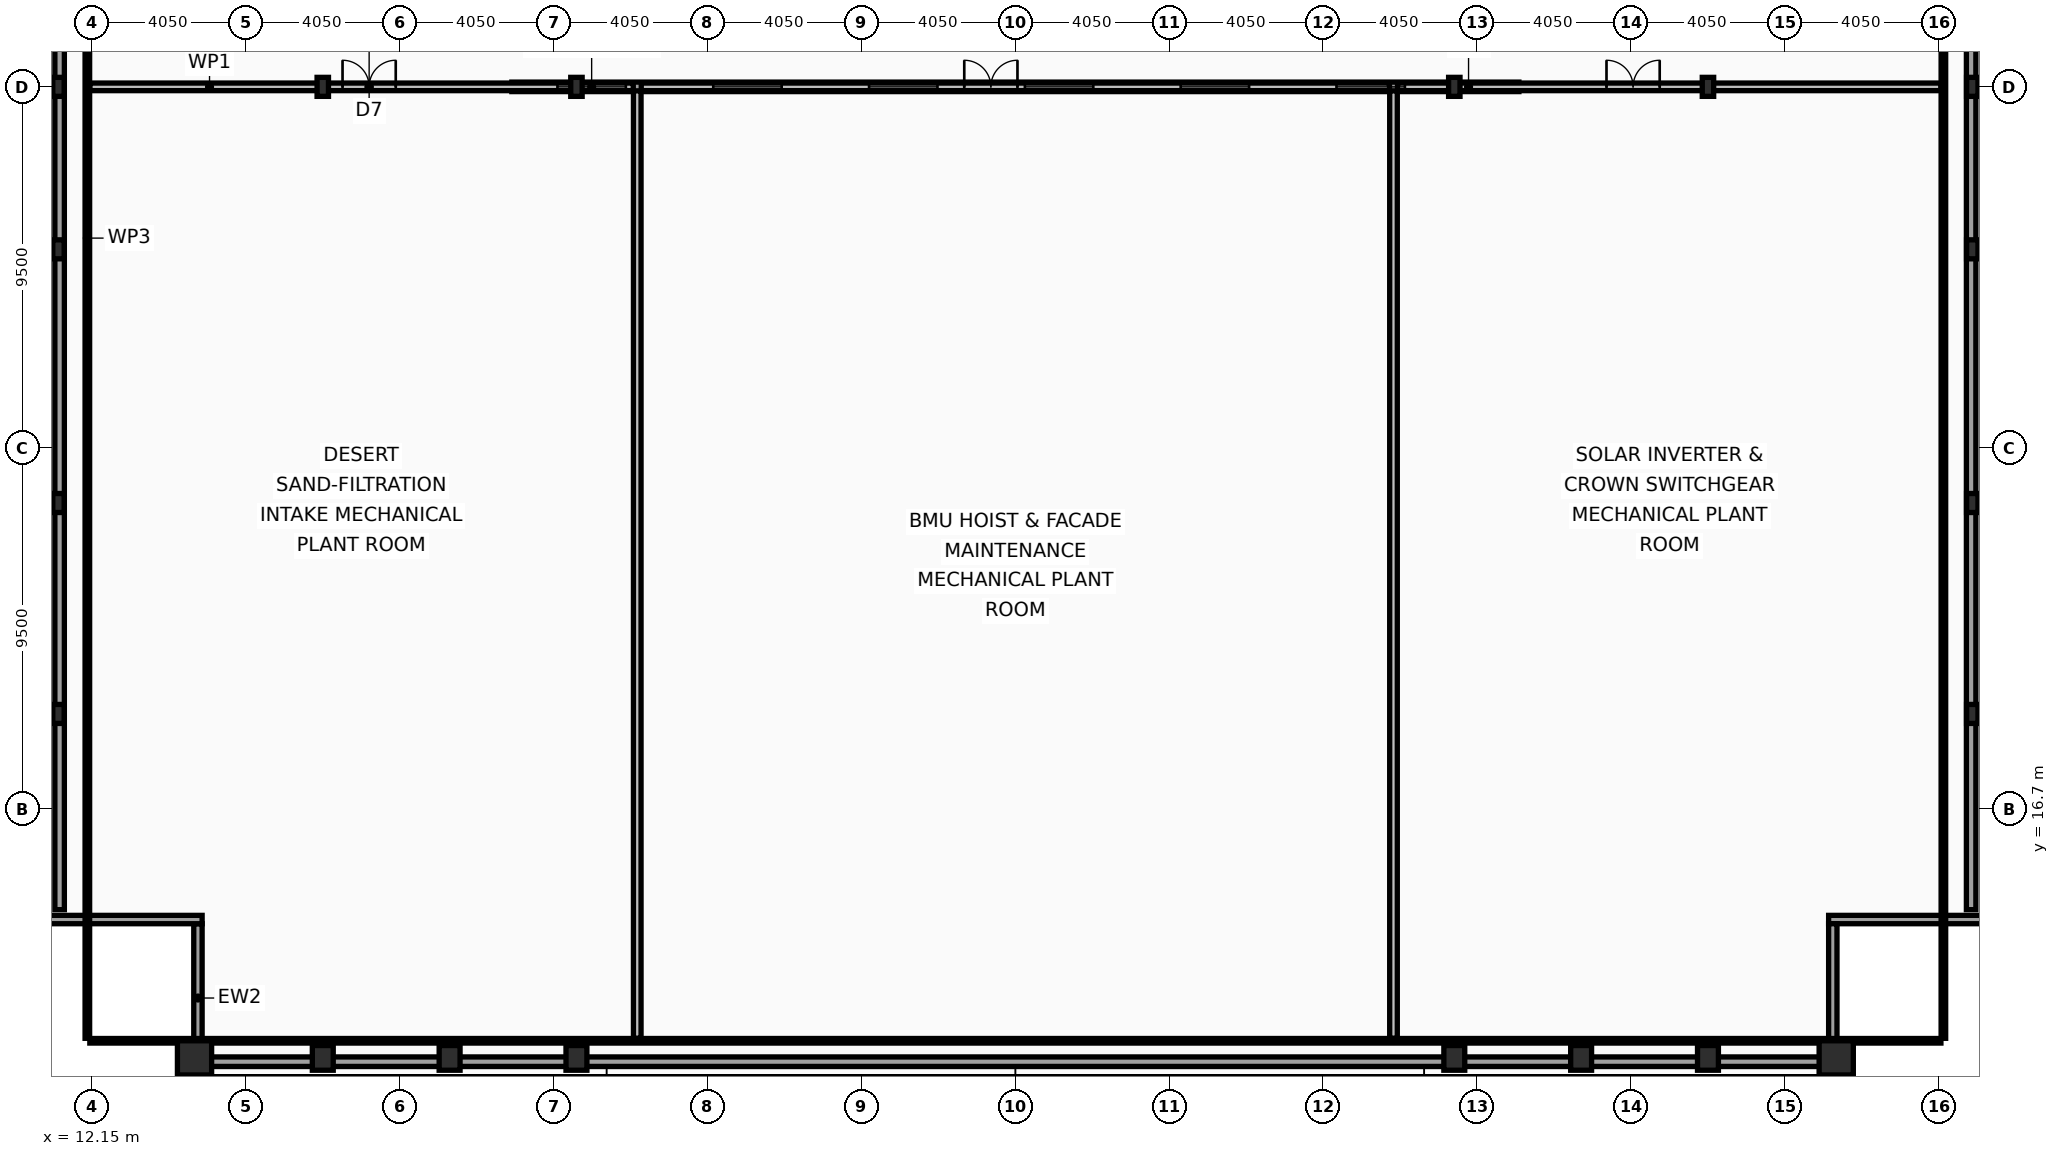
"""IFC4 building model, lengths in metres.
Left out: names, types, materials, properties, quantities, classifications, styles, units other than length and angle.
Written with IfcOpenShell. Run it as: python <this file> out.ifc"""

import sys

from ifc_helpers import new_model, si_unit, direction, frame, frame_2d, origin, origin_2d, place, context, subcontext, project, spatial, rectangle, hollow_rectangle, i_section, extrude, element, fill, save


model = new_model("IFC4")
c1 = context("Model", 3, precision=1e-05, world=origin(), true_north=direction((0.0, 1.0)))
c2 = subcontext(c1, "Body", "Model", "MODEL_VIEW")
j1 = project(units=[si_unit("LENGTHUNIT", "METRE"), si_unit("PLANEANGLEUNIT", "RADIAN")], contexts=[c1])
p1 = place(None, origin())
s1 = spatial("IfcSite", under=j1, at=p1, CompositionType="ELEMENT")
p2 = place(p1, origin())
s2 = spatial("IfcBuilding", under=s1, at=p2, CompositionType="ELEMENT")
p3 = place(p2, frame((0.0, 0.0, 378.6)))
s3 = spatial("IfcBuildingStorey", under=s2, at=p3, CompositionType="ELEMENT", Elevation=378.6)
for number, where, z_axis, x_axis in (
    (1, (14.85, 10.15, 0.0), (0.0, 0.0, 1.0), (1.0, 0.0, 0.0)),
    (2, (58.05, 10.15, 0.0), (0.0, 0.0, 1.0), (1.0, 0.0, 0.0)),
):
    element("IfcColumn", number, at=place(p3, frame(where, z_axis=z_axis, x_axis=x_axis)), inside=s3, PredefinedType="COLUMN", context=c2, shape_type="SweptSolid", body=[
        extrude(hollow_rectangle(XDim=0.9, YDim=0.9, WallThickness=0.05, at=origin_2d()), origin(), (0.0, 0.0, 1.0), 5.36),
    ])
for number, where, z_axis, x_axis in (
    (3, (18.225, 10.15, 0.0), (0.0, 0.0, 1.0), (1.0, 0.0, 0.0)),
    (4, (21.562, 10.15, 0.0), (0.0, 0.0, 1.0), (1.0, 0.0, 0.0)),
    (5, (24.9, 10.15, 0.0), (0.0, 0.0, 1.0), (1.0, 0.0, 0.0)),
    (6, (48.0, 10.15, 0.0), (0.0, 0.0, 1.0), (1.0, 0.0, 0.0)),
    (7, (51.337, 10.15, 0.0), (0.0, 0.0, 1.0), (1.0, 0.0, 0.0)),
    (8, (54.675, 10.15, 0.0), (0.0, 0.0, 1.0), (1.0, 0.0, 0.0)),
):
    element("IfcColumn", number, at=place(p3, frame(where, z_axis=z_axis, x_axis=x_axis)), inside=s3, PredefinedType="COLUMN", context=c2, shape_type="SweptSolid", body=[
        extrude(hollow_rectangle(XDim=0.55, YDim=0.65, WallThickness=0.04, at=origin_2d()), origin(), (0.0, 0.0, 1.0), 5.36),
    ])
for number, where, z_axis, x_axis in (
    (9, (11.27, 19.2, 0.0), (0.0, 0.0, 1.0), (1.0, 0.0, 0.0)),
    (10, (11.27, 24.75, 0.0), (0.0, 0.0, 1.0), (1.0, 0.0, 0.0)),
    (11, (11.27, 31.425, 0.0), (0.0, 0.0, 1.0), (1.0, 0.0, 0.0)),
    (12, (11.27, 35.7, 0.0), (0.0, 0.0, 1.0), (1.0, 0.0, 0.0)),
    (13, (61.63, 19.2, 0.0), (0.0, 0.0, 1.0), (1.0, 0.0, 0.0)),
    (14, (61.63, 24.75, 0.0), (0.0, 0.0, 1.0), (1.0, 0.0, 0.0)),
    (15, (61.63, 31.425, 0.0), (0.0, 0.0, 1.0), (1.0, 0.0, 0.0)),
    (16, (61.63, 35.7, 0.0), (0.0, 0.0, 1.0), (1.0, 0.0, 0.0)),
):
    element("IfcColumn", number, at=place(p3, frame(where, z_axis=z_axis, x_axis=x_axis)), inside=s3, PredefinedType="COLUMN", context=c2, shape_type="SweptSolid", body=[
        extrude(i_section(OverallWidth=0.3, OverallDepth=0.5, WebThickness=0.014, FlangeThickness=0.028, at=origin_2d()), origin(), (0.0, 0.0, 1.0), 5.36),
    ])
p4 = place(p3, frame((18.225, 35.7, 0.0), z_axis=(0.0, 0.0, 1.0), x_axis=(1.0, 0.0, 0.0)))
e17 = element("IfcColumn", 17, at=p4, inside=s3, PredefinedType="COLUMN", context=c2, shape_type="SweptSolid", body=[
    extrude(i_section(OverallWidth=0.3, OverallDepth=0.5, WebThickness=0.014, FlangeThickness=0.028, at=origin_2d()), origin(), (0.0, 0.0, 1.0), 5.28),
])
for number, where, z_axis, x_axis in (
    (18, (24.9, 35.7, 0.0), (0.0, 0.0, 1.0), (1.0, 0.0, 0.0)),
    (19, (48.0, 35.7, 0.0), (0.0, 0.0, 1.0), (1.0, 0.0, 0.0)),
):
    element("IfcColumn", number, at=place(p3, frame(where, z_axis=z_axis, x_axis=x_axis)), inside=s3, PredefinedType="COLUMN", context=c2, shape_type="SweptSolid", body=[
        extrude(i_section(OverallWidth=0.3, OverallDepth=0.5, WebThickness=0.014, FlangeThickness=0.028, at=origin_2d()), origin(), (0.0, 0.0, 1.0), 5.36),
    ])
p5 = place(p3, frame((54.675, 35.7, 0.0), z_axis=(0.0, 0.0, 1.0), x_axis=(1.0, 0.0, 0.0)))
e20 = element("IfcColumn", 20, at=p5, inside=s3, PredefinedType="COLUMN", context=c2, shape_type="SweptSolid", body=[
    extrude(i_section(OverallWidth=0.3, OverallDepth=0.5, WebThickness=0.014, FlangeThickness=0.028, at=origin_2d()), origin(), (0.0, 0.0, 1.0), 5.28),
])
p6 = place(p3, frame((14.94, 9.77, 0.0), z_axis=(0.0, 0.0, 1.0), x_axis=(0.0, 1.0, 0.0)))
e21 = element("IfcWall", 21, at=p6, inside=s3, PredefinedType="SOLIDWALL", context=c2, shape_type="SweptSolid", body=[
    extrude(rectangle(XDim=3.91, YDim=0.22, at=frame_2d((1.955, 0.0))), origin(), (0.0, 0.0, 1.0), 3.62),
])
p7 = place(p3, frame((15.05, 13.79, 0.0), z_axis=(0.0, 0.0, 1.0), x_axis=(-1.0, 0.0, 0.0)))
e22 = element("IfcWall", 22, at=p7, inside=s3, PredefinedType="SOLIDWALL", context=c2, shape_type="SweptSolid", body=[
    extrude(rectangle(XDim=4.13, YDim=0.22, at=frame_2d((2.065, 0.0))), origin(), (0.0, 0.0, 1.0), 3.62),
])
p8 = place(p3, frame((61.98, 13.79, 0.0), z_axis=(0.0, 0.0, 1.0), x_axis=(-1.0, 0.0, 0.0)))
e23 = element("IfcWall", 23, at=p8, inside=s3, PredefinedType="SOLIDWALL", context=c2, shape_type="SweptSolid", body=[
    extrude(rectangle(XDim=4.13, YDim=0.22, at=frame_2d((2.065, 0.0))), origin(), (0.0, 0.0, 1.0), 3.62),
])
p9 = place(p3, frame((57.96, 13.68, 0.0), z_axis=(0.0, 0.0, 1.0), x_axis=(0.0, -1.0, 0.0)))
e24 = element("IfcWall", 24, at=p9, inside=s3, PredefinedType="SOLIDWALL", context=c2, shape_type="SweptSolid", body=[
    extrude(rectangle(XDim=3.91, YDim=0.22, at=frame_2d((1.955, 0.0))), origin(), (0.0, 0.0, 1.0), 3.62),
])
p10 = place(p3, frame((23.2, 35.7, 5.6), z_axis=(0.0, 0.0, 1.0), x_axis=(1.0, 0.0, 0.0)))
e25 = element("IfcWall", 25, at=p10, inside=s3, PredefinedType="PARAPET", context=c2, shape_type="SweptSolid", body=[
    extrude(rectangle(XDim=26.5, YDim=0.25, at=frame_2d((13.25, 0.0))), origin(), (0.0, 0.0, 1.0), 0.93),
])
p11 = place(p10, frame((1.2, 0.0, 0.16)))
e26 = element("IfcOpeningElement", 26, at=p11, cuts=e25, PredefinedType="OPENING", context=c2, shape_type="SweptSolid", body=[
    extrude(rectangle(XDim=1.8, YDim=0.55, at=frame_2d((0.9, 0.275))), frame((0.0, 0.135, 0.0), z_axis=(0.0, -1.0, 0.0), x_axis=(1.0, 0.0, 0.0)), (0.0, 0.0, 1.0), 0.27),
])
p12 = place(p10, frame((5.3, 0.0, 0.16)))
e27 = element("IfcOpeningElement", 27, at=p12, cuts=e25, PredefinedType="OPENING", context=c2, shape_type="SweptSolid", body=[
    extrude(rectangle(XDim=1.8, YDim=0.55, at=frame_2d((0.9, 0.275))), frame((0.0, 0.135, 0.0), z_axis=(0.0, -1.0, 0.0), x_axis=(1.0, 0.0, 0.0)), (0.0, 0.0, 1.0), 0.27),
])
p13 = place(p10, frame((9.4, 0.0, 0.16)))
e28 = element("IfcOpeningElement", 28, at=p13, cuts=e25, PredefinedType="OPENING", context=c2, shape_type="SweptSolid", body=[
    extrude(rectangle(XDim=1.8, YDim=0.55, at=frame_2d((0.9, 0.275))), frame((0.0, 0.135, 0.0), z_axis=(0.0, -1.0, 0.0), x_axis=(1.0, 0.0, 0.0)), (0.0, 0.0, 1.0), 0.27),
])
p14 = place(p10, frame((13.5, 0.0, 0.16)))
e29 = element("IfcOpeningElement", 29, at=p14, cuts=e25, PredefinedType="OPENING", context=c2, shape_type="SweptSolid", body=[
    extrude(rectangle(XDim=1.8, YDim=0.55, at=frame_2d((0.9, 0.275))), frame((0.0, 0.135, 0.0), z_axis=(0.0, -1.0, 0.0), x_axis=(1.0, 0.0, 0.0)), (0.0, 0.0, 1.0), 0.27),
])
p15 = place(p10, frame((17.6, 0.0, 0.16)))
e30 = element("IfcOpeningElement", 30, at=p15, cuts=e25, PredefinedType="OPENING", context=c2, shape_type="SweptSolid", body=[
    extrude(rectangle(XDim=1.8, YDim=0.55, at=frame_2d((0.9, 0.275))), frame((0.0, 0.135, 0.0), z_axis=(0.0, -1.0, 0.0), x_axis=(1.0, 0.0, 0.0)), (0.0, 0.0, 1.0), 0.27),
])
p16 = place(p10, frame((21.7, 0.0, 0.16)))
e31 = element("IfcOpeningElement", 31, at=p16, cuts=e25, PredefinedType="OPENING", context=c2, shape_type="SweptSolid", body=[
    extrude(rectangle(XDim=1.8, YDim=0.55, at=frame_2d((0.9, 0.275))), frame((0.0, 0.135, 0.0), z_axis=(0.0, -1.0, 0.0), x_axis=(1.0, 0.0, 0.0)), (0.0, 0.0, 1.0), 0.27),
])
p17 = place(p3, frame((15.2, 10.05, 5.58), z_axis=(0.0, 0.0, 1.0), x_axis=(1.0, 0.0, 0.0)))
e32 = element("IfcWall", 32, at=p17, inside=s3, PredefinedType="PARAPET", context=c2, shape_type="SweptSolid", body=[
    extrude(rectangle(XDim=42.5, YDim=0.25, at=frame_2d((21.25, 0.0))), origin(), (0.0, 0.0, 1.0), 0.9),
])
for number, where, z_axis, x_axis in (
    (33, (11.3, 49.35, 5.58), (0.0, 0.0, 1.0), (0.0, -1.0, 0.0)),
    (34, (61.6, 14.05, 5.58), (0.0, 0.0, 1.0), (0.0, 1.0, 0.0)),
):
    element("IfcWall", number, at=place(p3, frame(where, z_axis=z_axis, x_axis=x_axis)), inside=s3, PredefinedType="PARAPET", context=c2, shape_type="SweptSolid", body=[
        extrude(rectangle(XDim=35.3, YDim=0.25, at=frame_2d((17.65, 0.0))), origin(), (0.0, 0.0, 1.0), 0.9),
    ])
p18 = place(p3, frame((12.095, 35.7, 0.0), z_axis=(0.0, 0.0, 1.0), x_axis=(1.0, 0.0, 0.0)))
e35 = element("IfcWall", 35, at=p18, inside=s3, PredefinedType="PARTITIONING", context=c2, shape_type="SweptSolid", body=[
    extrude(rectangle(XDim=14.3, YDim=0.2, at=frame_2d((7.15, 0.0))), origin(), (0.0, 0.0, 1.0), 4.18),
])
p19 = place(p18, frame((6.65, 0.0, 0.0)))
e36 = element("IfcOpeningElement", 36, at=p19, cuts=e35, PredefinedType="OPENING", context=c2, shape_type="SweptSolid", body=[
    extrude(rectangle(XDim=1.4, YDim=2.15, at=frame_2d((0.7, 1.075))), frame((0.0, 0.11, 0.0), z_axis=(0.0, -1.0, 0.0), x_axis=(1.0, 0.0, 0.0)), (0.0, 0.0, 1.0), 0.22),
])
p20 = place(p3, frame((26.605, 35.7, 0.0), z_axis=(0.0, 0.0, 1.0), x_axis=(1.0, 0.0, 0.0)))
e37 = element("IfcWall", 37, at=p20, inside=s3, PredefinedType="PARTITIONING", context=c2, shape_type="SweptSolid", body=[
    extrude(rectangle(XDim=19.69, YDim=0.2, at=frame_2d((9.845, 0.0))), origin(), (0.0, 0.0, 1.0), 4.18),
])
p21 = place(p20, frame((8.5, 0.0, 0.0)))
e38 = element("IfcOpeningElement", 38, at=p21, cuts=e37, PredefinedType="OPENING", context=c2, shape_type="SweptSolid", body=[
    extrude(rectangle(XDim=1.4, YDim=2.15, at=frame_2d((0.7, 1.075))), frame((0.0, 0.11, 0.0), z_axis=(0.0, -1.0, 0.0), x_axis=(1.0, 0.0, 0.0)), (0.0, 0.0, 1.0), 0.22),
])
p22 = place(p3, frame((46.505, 35.7, 0.0), z_axis=(0.0, 0.0, 1.0), x_axis=(1.0, 0.0, 0.0)))
e39 = element("IfcWall", 39, at=p22, inside=s3, PredefinedType="PARTITIONING", context=c2, shape_type="SweptSolid", body=[
    extrude(rectangle(XDim=14.3, YDim=0.2, at=frame_2d((7.15, 0.0))), origin(), (0.0, 0.0, 1.0), 4.18),
])
p23 = place(p22, frame((5.5, 0.0, 0.0)))
e40 = element("IfcOpeningElement", 40, at=p23, cuts=e39, PredefinedType="OPENING", context=c2, shape_type="SweptSolid", body=[
    extrude(rectangle(XDim=1.4, YDim=2.15, at=frame_2d((0.7, 1.075))), frame((0.0, 0.11, 0.0), z_axis=(0.0, -1.0, 0.0), x_axis=(1.0, 0.0, 0.0)), (0.0, 0.0, 1.0), 0.22),
])
for number, where, z_axis, x_axis in (
    (41, (26.5, 10.665, 0.0), (0.0, 0.0, 1.0), (0.0, 1.0, 0.0)),
    (42, (46.4, 10.665, 0.0), (0.0, 0.0, 1.0), (0.0, 1.0, 0.0)),
):
    element("IfcWall", number, at=place(p3, frame(where, z_axis=z_axis, x_axis=x_axis)), inside=s3, PredefinedType="PARTITIONING", context=c2, shape_type="SweptSolid", body=[
        extrude(rectangle(XDim=24.93, YDim=0.2, at=frame_2d((12.465, 0.0))), origin(), (0.0, 0.0, 1.0), 4.18),
    ])
for number, where, z_axis, x_axis in (
    (43, (12.03, 10.665, 0.0), (0.0, 0.0, 1.0), (0.0, 1.0, 0.0)),
    (44, (60.87, 10.665, 0.0), (0.0, 0.0, 1.0), (0.0, 1.0, 0.0)),
):
    element("IfcWall", number, at=place(p3, frame(where, z_axis=z_axis, x_axis=x_axis)), inside=s3, PredefinedType="PARTITIONING", context=c2, shape_type="SweptSolid", body=[
        extrude(rectangle(XDim=42.11, YDim=0.12, at=frame_2d((21.055, 0.0))), origin(), (0.0, 0.0, 1.0), 4.18),
    ])
p24 = place(p3, frame((12.095, 10.6, 0.0), z_axis=(0.0, 0.0, 1.0), x_axis=(1.0, 0.0, 0.0)))
e45 = element("IfcWall", 45, at=p24, inside=s3, PredefinedType="PARTITIONING", context=c2, shape_type="SweptSolid", body=[
    extrude(rectangle(XDim=48.71, YDim=0.12, at=frame_2d((24.355, 0.0))), origin(), (0.0, 0.0, 1.0), 4.18),
])
p25 = place(p11, origin())
e46 = element("IfcWindow", 46, at=p25, inside=s3, PartitioningType="SINGLE_PANEL", PredefinedType="SKYLIGHT", context=c2, shape_type="SweptSolid", body=[
    extrude(rectangle(XDim=1.8, YDim=0.55, at=frame_2d((0.9, 0.275))), frame((0.0, 0.03, 0.0), z_axis=(0.0, -1.0, 0.0), x_axis=(1.0, 0.0, 0.0)), (0.0, 0.0, 1.0), 0.06),
])
fill(e26, e46)
p26 = place(p12, origin())
e47 = element("IfcWindow", 47, at=p26, inside=s3, PartitioningType="SINGLE_PANEL", PredefinedType="SKYLIGHT", context=c2, shape_type="SweptSolid", body=[
    extrude(rectangle(XDim=1.8, YDim=0.55, at=frame_2d((0.9, 0.275))), frame((0.0, 0.03, 0.0), z_axis=(0.0, -1.0, 0.0), x_axis=(1.0, 0.0, 0.0)), (0.0, 0.0, 1.0), 0.06),
])
fill(e27, e47)
p27 = place(p13, origin())
e48 = element("IfcWindow", 48, at=p27, inside=s3, PartitioningType="SINGLE_PANEL", PredefinedType="SKYLIGHT", context=c2, shape_type="SweptSolid", body=[
    extrude(rectangle(XDim=1.8, YDim=0.55, at=frame_2d((0.9, 0.275))), frame((0.0, 0.03, 0.0), z_axis=(0.0, -1.0, 0.0), x_axis=(1.0, 0.0, 0.0)), (0.0, 0.0, 1.0), 0.06),
])
fill(e28, e48)
p28 = place(p14, origin())
e49 = element("IfcWindow", 49, at=p28, inside=s3, PartitioningType="SINGLE_PANEL", PredefinedType="SKYLIGHT", context=c2, shape_type="SweptSolid", body=[
    extrude(rectangle(XDim=1.8, YDim=0.55, at=frame_2d((0.9, 0.275))), frame((0.0, 0.03, 0.0), z_axis=(0.0, -1.0, 0.0), x_axis=(1.0, 0.0, 0.0)), (0.0, 0.0, 1.0), 0.06),
])
fill(e29, e49)
p29 = place(p15, origin())
e50 = element("IfcWindow", 50, at=p29, inside=s3, PartitioningType="SINGLE_PANEL", PredefinedType="SKYLIGHT", context=c2, shape_type="SweptSolid", body=[
    extrude(rectangle(XDim=1.8, YDim=0.55, at=frame_2d((0.9, 0.275))), frame((0.0, 0.03, 0.0), z_axis=(0.0, -1.0, 0.0), x_axis=(1.0, 0.0, 0.0)), (0.0, 0.0, 1.0), 0.06),
])
fill(e30, e50)
p30 = place(p16, origin())
e51 = element("IfcWindow", 51, at=p30, inside=s3, PartitioningType="SINGLE_PANEL", PredefinedType="SKYLIGHT", context=c2, shape_type="SweptSolid", body=[
    extrude(rectangle(XDim=1.8, YDim=0.55, at=frame_2d((0.9, 0.275))), frame((0.0, 0.03, 0.0), z_axis=(0.0, -1.0, 0.0), x_axis=(1.0, 0.0, 0.0)), (0.0, 0.0, 1.0), 0.06),
])
fill(e31, e51)
p31 = place(p19, origin())
e52 = element("IfcDoor", 52, at=p31, inside=s3, OperationType="DOUBLE_DOOR_SINGLE_SWING", PredefinedType="DOOR", context=c2, shape_type="SweptSolid", body=[
    extrude(rectangle(XDim=1.4, YDim=2.15, at=frame_2d((0.7, 1.075))), frame((0.0, 0.025, 0.0), z_axis=(0.0, -1.0, 0.0), x_axis=(1.0, 0.0, 0.0)), (0.0, 0.0, 1.0), 0.05),
])
fill(e36, e52)
p32 = place(p21, origin())
e53 = element("IfcDoor", 53, at=p32, inside=s3, OperationType="DOUBLE_DOOR_SINGLE_SWING", PredefinedType="DOOR", context=c2, shape_type="SweptSolid", body=[
    extrude(rectangle(XDim=1.4, YDim=2.15, at=frame_2d((0.7, 1.075))), frame((0.0, 0.025, 0.0), z_axis=(0.0, -1.0, 0.0), x_axis=(1.0, 0.0, 0.0)), (0.0, 0.0, 1.0), 0.05),
])
fill(e38, e53)
p33 = place(p23, origin())
e54 = element("IfcDoor", 54, at=p33, inside=s3, OperationType="DOUBLE_DOOR_SINGLE_SWING", PredefinedType="DOOR", context=c2, shape_type="SweptSolid", body=[
    extrude(rectangle(XDim=1.4, YDim=2.15, at=frame_2d((0.7, 1.075))), frame((0.0, 0.025, 0.0), z_axis=(0.0, -1.0, 0.0), x_axis=(1.0, 0.0, 0.0)), (0.0, 0.0, 1.0), 0.05),
])
fill(e40, e54)
save(model, sys.argv[1])
